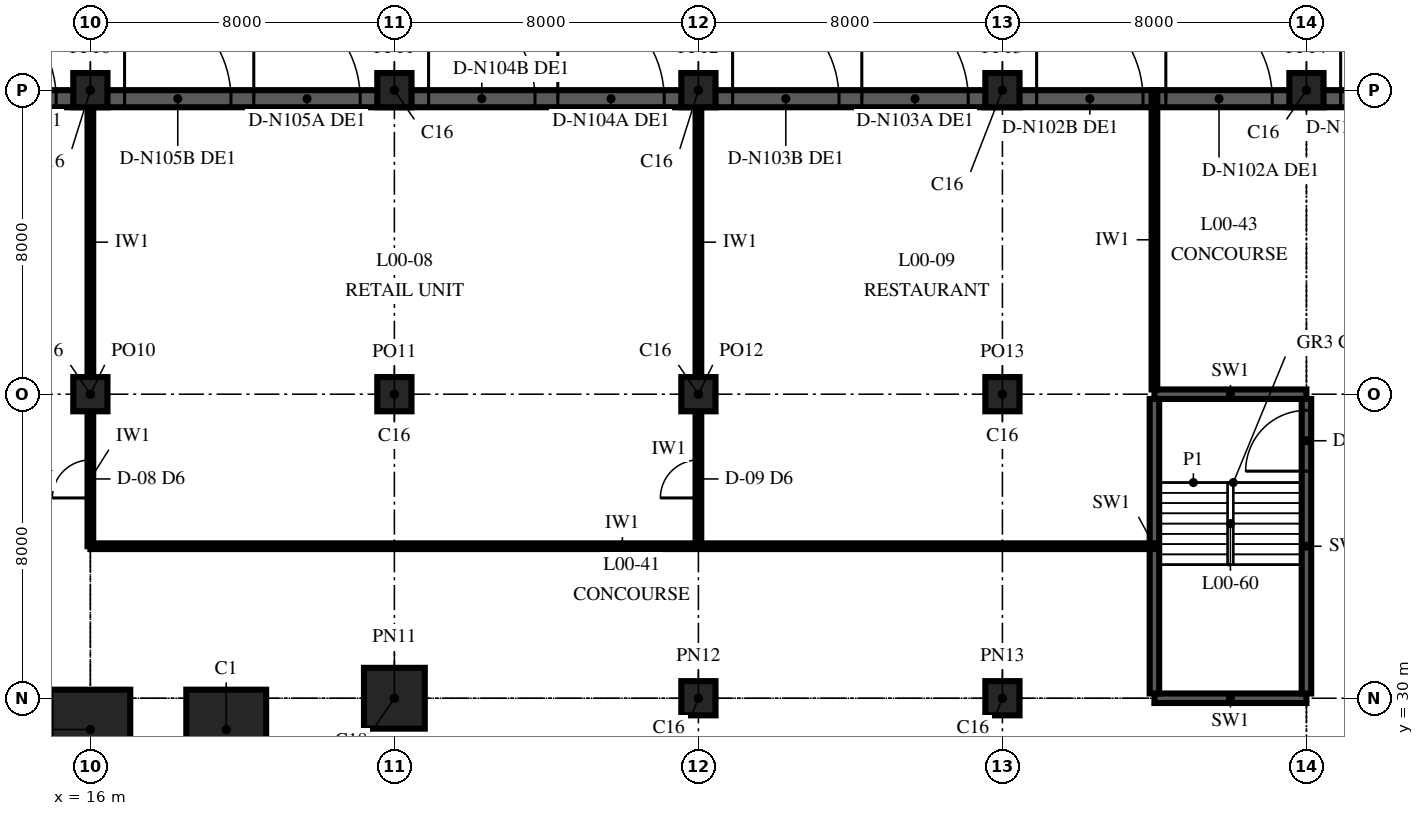
"""IFC4 building model, lengths in metres.
Left out: names, types, materials, properties, quantities, classifications, styles, units other than length and angle.
Written with IfcOpenShell. Run it as: python <this file> out.ifc"""

import sys

from ifc_helpers import new_model, si_unit, direction, frame, frame_2d, origin, origin_2d, place, context, subcontext, project, spatial, rectangle, extrude, element, fill, save


model = new_model("IFC4")
c1 = context("Model", 3, precision=1e-05, world=origin(), true_north=direction((0.0, 1.0)))
c2 = subcontext(c1, "Body", "Model", "MODEL_VIEW")
j1 = project(units=[si_unit("LENGTHUNIT", "METRE"), si_unit("PLANEANGLEUNIT", "RADIAN")], contexts=[c1])
p1 = place(None, origin())
s1 = spatial("IfcSite", under=j1, at=p1, CompositionType="ELEMENT")
p2 = place(p1, origin())
s2 = spatial("IfcBuilding", under=s1, at=p2, CompositionType="ELEMENT")
p3 = place(p2, origin())
s3 = spatial("IfcBuildingStorey", under=s2, at=p3, CompositionType="ELEMENT", Elevation=0.0)
for number, where, z_axis, x_axis in (
    (1, (19.575, 29.175, 0.0), (0.0, 0.0, 1.0), (-1.0, 0.0, 0.0)),
    (2, (16.0, 29.175, 0.0), (0.0, 0.0, 1.0), (-1.0, 0.0, 0.0)),
):
    element("IfcColumn", number, at=place(p3, frame(where, z_axis=z_axis, x_axis=x_axis)), inside=s3, PredefinedType="COLUMN", context=c2, shape_type="SweptSolid", body=[
        extrude(rectangle(XDim=2.1, YDim=2.1, at=origin_2d()), origin(), (0.0, 0.0, 1.0), 6.0),
    ])
for number, where, z_axis, x_axis in (
    (3, (16.0, 38.0, 0.0), (0.0, 0.0, 1.0), (1.0, 0.0, 0.0)),
    (4, (16.0, 46.0, 0.0), (0.0, 0.0, 1.0), (1.0, 0.0, 0.0)),
):
    element("IfcColumn", number, at=place(p3, frame(where, z_axis=z_axis, x_axis=x_axis)), inside=s3, PredefinedType="COLUMN", context=c2, shape_type="SweptSolid", body=[
        extrude(rectangle(XDim=0.9, YDim=0.9, at=origin_2d()), origin(), (0.0, 0.0, 1.0), 6.0),
    ])
p4 = place(p3, frame((24.0, 30.0, 0.0), z_axis=(0.0, 0.0, 1.0), x_axis=(1.0, 0.0, 0.0)))
e5 = element("IfcColumn", 5, at=p4, inside=s3, PredefinedType="COLUMN", context=c2, shape_type="SweptSolid", body=[
    extrude(rectangle(XDim=1.6, YDim=1.6, at=origin_2d()), origin(), (0.0, 0.0, 1.0), 6.0),
])
for number, where, z_axis, x_axis in (
    (6, (24.0, 38.0, 0.0), (0.0, 0.0, 1.0), (1.0, 0.0, 0.0)),
    (7, (24.0, 46.0, 0.0), (0.0, 0.0, 1.0), (1.0, 0.0, 0.0)),
    (8, (32.0, 30.0, 0.0), (0.0, 0.0, 1.0), (1.0, 0.0, 0.0)),
    (9, (32.0, 38.0, 0.0), (0.0, 0.0, 1.0), (1.0, 0.0, 0.0)),
    (10, (32.0, 46.0, 0.0), (0.0, 0.0, 1.0), (1.0, 0.0, 0.0)),
    (11, (40.0, 30.0, 0.0), (0.0, 0.0, 1.0), (1.0, 0.0, 0.0)),
    (12, (40.0, 38.0, 0.0), (0.0, 0.0, 1.0), (1.0, 0.0, 0.0)),
    (13, (40.0, 46.0, 0.0), (0.0, 0.0, 1.0), (1.0, 0.0, 0.0)),
    (14, (48.0, 46.0, 0.0), (0.0, 0.0, 1.0), (1.0, 0.0, 0.0)),
):
    element("IfcColumn", number, at=place(p3, frame(where, z_axis=z_axis, x_axis=x_axis)), inside=s3, PredefinedType="COLUMN", context=c2, shape_type="SweptSolid", body=[
        extrude(rectangle(XDim=0.9, YDim=0.9, at=origin_2d()), origin(), (0.0, 0.0, 1.0), 6.0),
    ])
p5 = place(p3, frame((56.0, 45.775, 0.0), z_axis=(0.0, 0.0, 1.0), x_axis=(-1.0, 0.0, 0.0)))
e15 = element("IfcWall", 15, at=p5, inside=s3, PredefinedType="SOLIDWALL", context=c2, shape_type="SweptSolid", body=[
    extrude(rectangle(XDim=90.0, YDim=0.45, at=frame_2d((45.0, 0.0))), origin(), (0.0, 0.0, 1.0), 6.0),
])
p6 = place(p5, frame((0.9, 0.0, 0.0)))
e16 = element("IfcOpeningElement", 16, at=p6, cuts=e15, PredefinedType="OPENING", context=c2, shape_type="SweptSolid", body=[
    extrude(rectangle(XDim=2.8, YDim=2.4, at=frame_2d((1.4, 1.2))), frame((0.0, 0.24, 0.0), z_axis=(0.0, -1.0, 0.0), x_axis=(1.0, 0.0, 0.0)), (0.0, 0.0, 1.0), 0.48),
])
p7 = place(p5, frame((4.3, 0.0, 0.0)))
e17 = element("IfcOpeningElement", 17, at=p7, cuts=e15, PredefinedType="OPENING", context=c2, shape_type="SweptSolid", body=[
    extrude(rectangle(XDim=2.8, YDim=2.4, at=frame_2d((1.4, 1.2))), frame((0.0, 0.24, 0.0), z_axis=(0.0, -1.0, 0.0), x_axis=(1.0, 0.0, 0.0)), (0.0, 0.0, 1.0), 0.48),
])
p8 = place(p5, frame((8.9, 0.0, 0.0)))
e18 = element("IfcOpeningElement", 18, at=p8, cuts=e15, PredefinedType="OPENING", context=c2, shape_type="SweptSolid", body=[
    extrude(rectangle(XDim=2.8, YDim=2.4, at=frame_2d((1.4, 1.2))), frame((0.0, 0.24, 0.0), z_axis=(0.0, -1.0, 0.0), x_axis=(1.0, 0.0, 0.0)), (0.0, 0.0, 1.0), 0.48),
])
p9 = place(p5, frame((12.3, 0.0, 0.0)))
e19 = element("IfcOpeningElement", 19, at=p9, cuts=e15, PredefinedType="OPENING", context=c2, shape_type="SweptSolid", body=[
    extrude(rectangle(XDim=2.8, YDim=2.4, at=frame_2d((1.4, 1.2))), frame((0.0, 0.24, 0.0), z_axis=(0.0, -1.0, 0.0), x_axis=(1.0, 0.0, 0.0)), (0.0, 0.0, 1.0), 0.48),
])
p10 = place(p5, frame((16.9, 0.0, 0.0)))
e20 = element("IfcOpeningElement", 20, at=p10, cuts=e15, PredefinedType="OPENING", context=c2, shape_type="SweptSolid", body=[
    extrude(rectangle(XDim=2.8, YDim=2.4, at=frame_2d((1.4, 1.2))), frame((0.0, 0.24, 0.0), z_axis=(0.0, -1.0, 0.0), x_axis=(1.0, 0.0, 0.0)), (0.0, 0.0, 1.0), 0.48),
])
p11 = place(p5, frame((20.3, 0.0, 0.0)))
e21 = element("IfcOpeningElement", 21, at=p11, cuts=e15, PredefinedType="OPENING", context=c2, shape_type="SweptSolid", body=[
    extrude(rectangle(XDim=2.8, YDim=2.4, at=frame_2d((1.4, 1.2))), frame((0.0, 0.24, 0.0), z_axis=(0.0, -1.0, 0.0), x_axis=(1.0, 0.0, 0.0)), (0.0, 0.0, 1.0), 0.48),
])
p12 = place(p5, frame((24.9, 0.0, 0.0)))
e22 = element("IfcOpeningElement", 22, at=p12, cuts=e15, PredefinedType="OPENING", context=c2, shape_type="SweptSolid", body=[
    extrude(rectangle(XDim=2.8, YDim=2.4, at=frame_2d((1.4, 1.2))), frame((0.0, 0.24, 0.0), z_axis=(0.0, -1.0, 0.0), x_axis=(1.0, 0.0, 0.0)), (0.0, 0.0, 1.0), 0.48),
])
p13 = place(p5, frame((28.3, 0.0, 0.0)))
e23 = element("IfcOpeningElement", 23, at=p13, cuts=e15, PredefinedType="OPENING", context=c2, shape_type="SweptSolid", body=[
    extrude(rectangle(XDim=2.8, YDim=2.4, at=frame_2d((1.4, 1.2))), frame((0.0, 0.24, 0.0), z_axis=(0.0, -1.0, 0.0), x_axis=(1.0, 0.0, 0.0)), (0.0, 0.0, 1.0), 0.48),
])
p14 = place(p5, frame((32.9, 0.0, 0.0)))
e24 = element("IfcOpeningElement", 24, at=p14, cuts=e15, PredefinedType="OPENING", context=c2, shape_type="SweptSolid", body=[
    extrude(rectangle(XDim=2.8, YDim=2.4, at=frame_2d((1.4, 1.2))), frame((0.0, 0.24, 0.0), z_axis=(0.0, -1.0, 0.0), x_axis=(1.0, 0.0, 0.0)), (0.0, 0.0, 1.0), 0.48),
])
p15 = place(p5, frame((36.3, 0.0, 0.0)))
e25 = element("IfcOpeningElement", 25, at=p15, cuts=e15, PredefinedType="OPENING", context=c2, shape_type="SweptSolid", body=[
    extrude(rectangle(XDim=2.8, YDim=2.4, at=frame_2d((1.4, 1.2))), frame((0.0, 0.24, 0.0), z_axis=(0.0, -1.0, 0.0), x_axis=(1.0, 0.0, 0.0)), (0.0, 0.0, 1.0), 0.48),
])
p16 = place(p5, frame((40.9, 0.0, 0.0)))
e26 = element("IfcOpeningElement", 26, at=p16, cuts=e15, PredefinedType="OPENING", context=c2, shape_type="SweptSolid", body=[
    extrude(rectangle(XDim=2.8, YDim=2.4, at=frame_2d((1.4, 1.2))), frame((0.0, 0.24, 0.0), z_axis=(0.0, -1.0, 0.0), x_axis=(1.0, 0.0, 0.0)), (0.0, 0.0, 1.0), 0.48),
])
p17 = place(p5, frame((44.3, 0.0, 0.0)))
e27 = element("IfcOpeningElement", 27, at=p17, cuts=e15, PredefinedType="OPENING", context=c2, shape_type="SweptSolid", body=[
    extrude(rectangle(XDim=2.8, YDim=2.4, at=frame_2d((1.4, 1.2))), frame((0.0, 0.24, 0.0), z_axis=(0.0, -1.0, 0.0), x_axis=(1.0, 0.0, 0.0)), (0.0, 0.0, 1.0), 0.48),
])
p18 = place(p5, frame((48.9, 0.0, 0.0)))
e28 = element("IfcOpeningElement", 28, at=p18, cuts=e15, PredefinedType="OPENING", context=c2, shape_type="SweptSolid", body=[
    extrude(rectangle(XDim=2.8, YDim=2.4, at=frame_2d((1.4, 1.2))), frame((0.0, 0.24, 0.0), z_axis=(0.0, -1.0, 0.0), x_axis=(1.0, 0.0, 0.0)), (0.0, 0.0, 1.0), 0.48),
])
p19 = place(p5, frame((52.3, 0.0, 0.0)))
e29 = element("IfcOpeningElement", 29, at=p19, cuts=e15, PredefinedType="OPENING", context=c2, shape_type="SweptSolid", body=[
    extrude(rectangle(XDim=2.8, YDim=2.4, at=frame_2d((1.4, 1.2))), frame((0.0, 0.24, 0.0), z_axis=(0.0, -1.0, 0.0), x_axis=(1.0, 0.0, 0.0)), (0.0, 0.0, 1.0), 0.48),
])
p20 = place(p5, frame((56.9, 0.0, 0.0)))
e30 = element("IfcOpeningElement", 30, at=p20, cuts=e15, PredefinedType="OPENING", context=c2, shape_type="SweptSolid", body=[
    extrude(rectangle(XDim=2.8, YDim=2.4, at=frame_2d((1.4, 1.2))), frame((0.0, 0.24, 0.0), z_axis=(0.0, -1.0, 0.0), x_axis=(1.0, 0.0, 0.0)), (0.0, 0.0, 1.0), 0.48),
])
p21 = place(p5, frame((60.3, 0.0, 0.0)))
e31 = element("IfcOpeningElement", 31, at=p21, cuts=e15, PredefinedType="OPENING", context=c2, shape_type="SweptSolid", body=[
    extrude(rectangle(XDim=2.8, YDim=2.4, at=frame_2d((1.4, 1.2))), frame((0.0, 0.24, 0.0), z_axis=(0.0, -1.0, 0.0), x_axis=(1.0, 0.0, 0.0)), (0.0, 0.0, 1.0), 0.48),
])
p22 = place(p5, frame((64.9, 0.0, 0.0)))
e32 = element("IfcOpeningElement", 32, at=p22, cuts=e15, PredefinedType="OPENING", context=c2, shape_type="SweptSolid", body=[
    extrude(rectangle(XDim=2.8, YDim=2.4, at=frame_2d((1.4, 1.2))), frame((0.0, 0.24, 0.0), z_axis=(0.0, -1.0, 0.0), x_axis=(1.0, 0.0, 0.0)), (0.0, 0.0, 1.0), 0.48),
])
p23 = place(p5, frame((68.3, 0.0, 0.0)))
e33 = element("IfcOpeningElement", 33, at=p23, cuts=e15, PredefinedType="OPENING", context=c2, shape_type="SweptSolid", body=[
    extrude(rectangle(XDim=2.8, YDim=2.4, at=frame_2d((1.4, 1.2))), frame((0.0, 0.24, 0.0), z_axis=(0.0, -1.0, 0.0), x_axis=(1.0, 0.0, 0.0)), (0.0, 0.0, 1.0), 0.48),
])
p24 = place(p5, frame((72.9, 0.0, 0.0)))
e34 = element("IfcOpeningElement", 34, at=p24, cuts=e15, PredefinedType="OPENING", context=c2, shape_type="SweptSolid", body=[
    extrude(rectangle(XDim=2.8, YDim=2.4, at=frame_2d((1.4, 1.2))), frame((0.0, 0.24, 0.0), z_axis=(0.0, -1.0, 0.0), x_axis=(1.0, 0.0, 0.0)), (0.0, 0.0, 1.0), 0.48),
])
p25 = place(p5, frame((76.3, 0.0, 0.0)))
e35 = element("IfcOpeningElement", 35, at=p25, cuts=e15, PredefinedType="OPENING", context=c2, shape_type="SweptSolid", body=[
    extrude(rectangle(XDim=2.8, YDim=2.4, at=frame_2d((1.4, 1.2))), frame((0.0, 0.24, 0.0), z_axis=(0.0, -1.0, 0.0), x_axis=(1.0, 0.0, 0.0)), (0.0, 0.0, 1.0), 0.48),
])
p26 = place(p5, frame((80.9, 0.0, 0.0)))
e36 = element("IfcOpeningElement", 36, at=p26, cuts=e15, PredefinedType="OPENING", context=c2, shape_type="SweptSolid", body=[
    extrude(rectangle(XDim=2.8, YDim=2.4, at=frame_2d((1.4, 1.2))), frame((0.0, 0.24, 0.0), z_axis=(0.0, -1.0, 0.0), x_axis=(1.0, 0.0, 0.0)), (0.0, 0.0, 1.0), 0.48),
])
p27 = place(p5, frame((84.3, 0.0, 0.0)))
e37 = element("IfcOpeningElement", 37, at=p27, cuts=e15, PredefinedType="OPENING", context=c2, shape_type="SweptSolid", body=[
    extrude(rectangle(XDim=2.8, YDim=2.4, at=frame_2d((1.4, 1.2))), frame((0.0, 0.24, 0.0), z_axis=(0.0, -1.0, 0.0), x_axis=(1.0, 0.0, 0.0)), (0.0, 0.0, 1.0), 0.48),
])
for number, where, z_axis, x_axis in (
    (38, (44.0, 30.0, 0.0), (0.0, 0.0, 1.0), (1.0, 0.0, 0.0)),
    (39, (48.0, 38.0, 0.0), (0.0, 0.0, 1.0), (-1.0, 0.0, 0.0)),
):
    element("IfcWall", number, at=place(p3, frame(where, z_axis=z_axis, x_axis=x_axis)), inside=s3, PredefinedType="SOLIDWALL", context=c2, shape_type="SweptSolid", body=[
        extrude(rectangle(XDim=4.0, YDim=0.25, at=frame_2d((2.0, 0.0))), origin(), (0.0, 0.0, 1.0), 6.0),
    ])
p28 = place(p3, frame((48.0, 30.125, 0.0), z_axis=(0.0, 0.0, 1.0), x_axis=(0.0, 1.0, 0.0)))
e40 = element("IfcWall", 40, at=p28, inside=s3, PredefinedType="SOLIDWALL", context=c2, shape_type="SweptSolid", body=[
    extrude(rectangle(XDim=7.75, YDim=0.25, at=frame_2d((3.875, 0.0))), origin(), (0.0, 0.0, 1.0), 6.0),
])
p29 = place(p28, frame((5.85, 0.0, 0.0)))
e41 = element("IfcOpeningElement", 41, at=p29, cuts=e40, PredefinedType="OPENING", context=c2, shape_type="SweptSolid", body=[
    extrude(rectangle(XDim=1.6, YDim=2.1, at=frame_2d((0.8, 1.05))), frame((0.0, 0.14, 0.0), z_axis=(0.0, -1.0, 0.0), x_axis=(1.0, 0.0, 0.0)), (0.0, 0.0, 1.0), 0.28),
])
p30 = place(p3, frame((44.0, 37.875, 0.0), z_axis=(0.0, 0.0, 1.0), x_axis=(0.0, -1.0, 0.0)))
e42 = element("IfcWall", 42, at=p30, inside=s3, PredefinedType="SOLIDWALL", context=c2, shape_type="SweptSolid", body=[
    extrude(rectangle(XDim=7.75, YDim=0.25, at=frame_2d((3.875, 0.0))), origin(), (0.0, 0.0, 1.0), 6.0),
])
p31 = place(p3, frame((16.0, 34.0, 0.0), z_axis=(0.0, 0.0, 1.0), x_axis=(0.0, 1.0, 0.0)))
e43 = element("IfcWall", 43, at=p31, inside=s3, PredefinedType="PARTITIONING", context=c2, shape_type="SweptSolid", body=[
    extrude(rectangle(XDim=3.54, YDim=0.15, at=frame_2d((1.77, 0.0))), origin(), (0.0, 0.0, 1.0), 5.7),
])
p32 = place(p31, frame((1.27, 0.0, 0.0)))
e44 = element("IfcOpeningElement", 44, at=p32, cuts=e43, PredefinedType="OPENING", context=c2, shape_type="SweptSolid", body=[
    extrude(rectangle(XDim=1.0, YDim=2.1, at=frame_2d((0.5, 1.05))), frame((0.0, 0.09, 0.0), z_axis=(0.0, -1.0, 0.0), x_axis=(1.0, 0.0, 0.0)), (0.0, 0.0, 1.0), 0.18),
])
p33 = place(p3, frame((16.0, 38.46, 0.0), z_axis=(0.0, 0.0, 1.0), x_axis=(0.0, 1.0, 0.0)))
e45 = element("IfcWall", 45, at=p33, inside=s3, PredefinedType="PARTITIONING", context=c2, shape_type="SweptSolid", body=[
    extrude(rectangle(XDim=7.08, YDim=0.15, at=frame_2d((3.54, 0.0))), origin(), (0.0, 0.0, 1.0), 5.05),
])
p34 = place(p3, frame((32.0, 34.0, 0.0), z_axis=(0.0, 0.0, 1.0), x_axis=(0.0, 1.0, 0.0)))
e46 = element("IfcWall", 46, at=p34, inside=s3, PredefinedType="PARTITIONING", context=c2, shape_type="SweptSolid", body=[
    extrude(rectangle(XDim=3.54, YDim=0.15, at=frame_2d((1.77, 0.0))), origin(), (0.0, 0.0, 1.0), 5.05),
])
p35 = place(p34, frame((1.27, 0.0, 0.0)))
e47 = element("IfcOpeningElement", 47, at=p35, cuts=e46, PredefinedType="OPENING", context=c2, shape_type="SweptSolid", body=[
    extrude(rectangle(XDim=1.0, YDim=2.1, at=frame_2d((0.5, 1.05))), frame((0.0, 0.09, 0.0), z_axis=(0.0, -1.0, 0.0), x_axis=(1.0, 0.0, 0.0)), (0.0, 0.0, 1.0), 0.18),
])
p36 = place(p3, frame((32.0, 38.46, 0.0), z_axis=(0.0, 0.0, 1.0), x_axis=(0.0, 1.0, 0.0)))
e48 = element("IfcWall", 48, at=p36, inside=s3, PredefinedType="PARTITIONING", context=c2, shape_type="SweptSolid", body=[
    extrude(rectangle(XDim=7.08, YDim=0.15, at=frame_2d((3.54, 0.0))), origin(), (0.0, 0.0, 1.0), 5.05),
])
p37 = place(p3, frame((44.0, 38.125, 0.0), z_axis=(0.0, 0.0, 1.0), x_axis=(0.0, 1.0, 0.0)))
e49 = element("IfcWall", 49, at=p37, inside=s3, PredefinedType="PARTITIONING", context=c2, shape_type="SweptSolid", body=[
    extrude(rectangle(XDim=7.875, YDim=0.15, at=frame_2d((3.938, 0.0))), origin(), (0.0, 0.0, 1.0), 5.7),
])
p38 = place(p3, frame((16.0, 34.0, 0.0), z_axis=(0.0, 0.0, 1.0), x_axis=(1.0, 0.0, 0.0)))
e50 = element("IfcWall", 50, at=p38, inside=s3, PredefinedType="PARTITIONING", context=c2, shape_type="SweptSolid", body=[
    extrude(rectangle(XDim=28.0, YDim=0.15, at=frame_2d((14.0, 0.0))), origin(), (0.0, 0.0, 1.0), 5.7),
])
p39 = place(p7, frame((2.8, 0.0, 0.0), z_axis=(0.0, 0.0, 1.0), x_axis=(-1.0, 0.0, 0.0)))
e51 = element("IfcDoor", 51, at=p39, inside=s3, OperationType="DOUBLE_DOOR_SINGLE_SWING", PredefinedType="DOOR", context=c2, shape_type="SweptSolid", body=[
    extrude(rectangle(XDim=2.8, YDim=2.4, at=frame_2d((1.4, 1.2))), frame((0.0, 0.225, 0.0), z_axis=(0.0, -1.0, 0.0), x_axis=(1.0, 0.0, 0.0)), (0.0, 0.0, 1.0), 0.449),
])
fill(e17, e51)
p40 = place(p8, frame((2.8, 0.0, 0.0), z_axis=(0.0, 0.0, 1.0), x_axis=(-1.0, 0.0, 0.0)))
e52 = element("IfcDoor", 52, at=p40, inside=s3, OperationType="DOUBLE_DOOR_SINGLE_SWING", PredefinedType="DOOR", context=c2, shape_type="SweptSolid", body=[
    extrude(rectangle(XDim=2.8, YDim=2.4, at=frame_2d((1.4, 1.2))), frame((0.0, 0.225, 0.0), z_axis=(0.0, -1.0, 0.0), x_axis=(1.0, 0.0, 0.0)), (0.0, 0.0, 1.0), 0.449),
])
fill(e18, e52)
p41 = place(p9, frame((2.8, 0.0, 0.0), z_axis=(0.0, 0.0, 1.0), x_axis=(-1.0, 0.0, 0.0)))
e53 = element("IfcDoor", 53, at=p41, inside=s3, OperationType="DOUBLE_DOOR_SINGLE_SWING", PredefinedType="DOOR", context=c2, shape_type="SweptSolid", body=[
    extrude(rectangle(XDim=2.8, YDim=2.4, at=frame_2d((1.4, 1.2))), frame((0.0, 0.225, 0.0), z_axis=(0.0, -1.0, 0.0), x_axis=(1.0, 0.0, 0.0)), (0.0, 0.0, 1.0), 0.449),
])
fill(e19, e53)
p42 = place(p10, frame((2.8, 0.0, 0.0), z_axis=(0.0, 0.0, 1.0), x_axis=(-1.0, 0.0, 0.0)))
e54 = element("IfcDoor", 54, at=p42, inside=s3, OperationType="DOUBLE_DOOR_SINGLE_SWING", PredefinedType="DOOR", context=c2, shape_type="SweptSolid", body=[
    extrude(rectangle(XDim=2.8, YDim=2.4, at=frame_2d((1.4, 1.2))), frame((0.0, 0.225, 0.0), z_axis=(0.0, -1.0, 0.0), x_axis=(1.0, 0.0, 0.0)), (0.0, 0.0, 1.0), 0.449),
])
fill(e20, e54)
p43 = place(p11, frame((2.8, 0.0, 0.0), z_axis=(0.0, 0.0, 1.0), x_axis=(-1.0, 0.0, 0.0)))
e55 = element("IfcDoor", 55, at=p43, inside=s3, OperationType="DOUBLE_DOOR_SINGLE_SWING", PredefinedType="DOOR", context=c2, shape_type="SweptSolid", body=[
    extrude(rectangle(XDim=2.8, YDim=2.4, at=frame_2d((1.4, 1.2))), frame((0.0, 0.225, 0.0), z_axis=(0.0, -1.0, 0.0), x_axis=(1.0, 0.0, 0.0)), (0.0, 0.0, 1.0), 0.449),
])
fill(e21, e55)
p44 = place(p12, frame((2.8, 0.0, 0.0), z_axis=(0.0, 0.0, 1.0), x_axis=(-1.0, 0.0, 0.0)))
e56 = element("IfcDoor", 56, at=p44, inside=s3, OperationType="DOUBLE_DOOR_SINGLE_SWING", PredefinedType="DOOR", context=c2, shape_type="SweptSolid", body=[
    extrude(rectangle(XDim=2.8, YDim=2.4, at=frame_2d((1.4, 1.2))), frame((0.0, 0.225, 0.0), z_axis=(0.0, -1.0, 0.0), x_axis=(1.0, 0.0, 0.0)), (0.0, 0.0, 1.0), 0.449),
])
fill(e22, e56)
p45 = place(p13, frame((2.8, 0.0, 0.0), z_axis=(0.0, 0.0, 1.0), x_axis=(-1.0, 0.0, 0.0)))
e57 = element("IfcDoor", 57, at=p45, inside=s3, OperationType="DOUBLE_DOOR_SINGLE_SWING", PredefinedType="DOOR", context=c2, shape_type="SweptSolid", body=[
    extrude(rectangle(XDim=2.8, YDim=2.4, at=frame_2d((1.4, 1.2))), frame((0.0, 0.225, 0.0), z_axis=(0.0, -1.0, 0.0), x_axis=(1.0, 0.0, 0.0)), (0.0, 0.0, 1.0), 0.449),
])
fill(e23, e57)
p46 = place(p14, frame((2.8, 0.0, 0.0), z_axis=(0.0, 0.0, 1.0), x_axis=(-1.0, 0.0, 0.0)))
e58 = element("IfcDoor", 58, at=p46, inside=s3, OperationType="DOUBLE_DOOR_SINGLE_SWING", PredefinedType="DOOR", context=c2, shape_type="SweptSolid", body=[
    extrude(rectangle(XDim=2.8, YDim=2.4, at=frame_2d((1.4, 1.2))), frame((0.0, 0.225, 0.0), z_axis=(0.0, -1.0, 0.0), x_axis=(1.0, 0.0, 0.0)), (0.0, 0.0, 1.0), 0.449),
])
fill(e24, e58)
p47 = place(p15, frame((2.8, 0.0, 0.0), z_axis=(0.0, 0.0, 1.0), x_axis=(-1.0, 0.0, 0.0)))
e59 = element("IfcDoor", 59, at=p47, inside=s3, OperationType="DOUBLE_DOOR_SINGLE_SWING", PredefinedType="DOOR", context=c2, shape_type="SweptSolid", body=[
    extrude(rectangle(XDim=2.8, YDim=2.4, at=frame_2d((1.4, 1.2))), frame((0.0, 0.225, 0.0), z_axis=(0.0, -1.0, 0.0), x_axis=(1.0, 0.0, 0.0)), (0.0, 0.0, 1.0), 0.449),
])
fill(e25, e59)
p48 = place(p16, frame((2.8, 0.0, 0.0), z_axis=(0.0, 0.0, 1.0), x_axis=(-1.0, 0.0, 0.0)))
e60 = element("IfcDoor", 60, at=p48, inside=s3, OperationType="DOUBLE_DOOR_SINGLE_SWING", PredefinedType="DOOR", context=c2, shape_type="SweptSolid", body=[
    extrude(rectangle(XDim=2.8, YDim=2.4, at=frame_2d((1.4, 1.2))), frame((0.0, 0.225, 0.0), z_axis=(0.0, -1.0, 0.0), x_axis=(1.0, 0.0, 0.0)), (0.0, 0.0, 1.0), 0.449),
])
fill(e26, e60)
p49 = place(p29, origin())
e61 = element("IfcDoor", 61, at=p49, inside=s3, OperationType="DOUBLE_DOOR_SINGLE_SWING", PredefinedType="DOOR", context=c2, shape_type="SweptSolid", body=[
    extrude(rectangle(XDim=1.6, YDim=2.1, at=frame_2d((0.8, 1.05))), frame((0.0, 0.125, 0.0), z_axis=(0.0, -1.0, 0.0), x_axis=(1.0, 0.0, 0.0)), (0.0, 0.0, 1.0), 0.25),
])
fill(e41, e61)
p50 = place(p32, origin())
e62 = element("IfcDoor", 62, at=p50, inside=s3, OperationType="SINGLE_SWING_LEFT", PredefinedType="DOOR", context=c2, shape_type="SweptSolid", body=[
    extrude(rectangle(XDim=1.0, YDim=2.1, at=frame_2d((0.5, 1.05))), frame((0.0, 0.075, 0.0), z_axis=(0.0, -1.0, 0.0), x_axis=(1.0, 0.0, 0.0)), (0.0, 0.0, 1.0), 0.149),
])
fill(e44, e62)
p51 = place(p35, origin())
e63 = element("IfcDoor", 63, at=p51, inside=s3, OperationType="SINGLE_SWING_LEFT", PredefinedType="DOOR", context=c2, shape_type="SweptSolid", body=[
    extrude(rectangle(XDim=1.0, YDim=2.1, at=frame_2d((0.5, 1.05))), frame((0.0, 0.075, 0.0), z_axis=(0.0, -1.0, 0.0), x_axis=(1.0, 0.0, 0.0)), (0.0, 0.0, 1.0), 0.149),
])
fill(e47, e63)
save(model, sys.argv[1])
